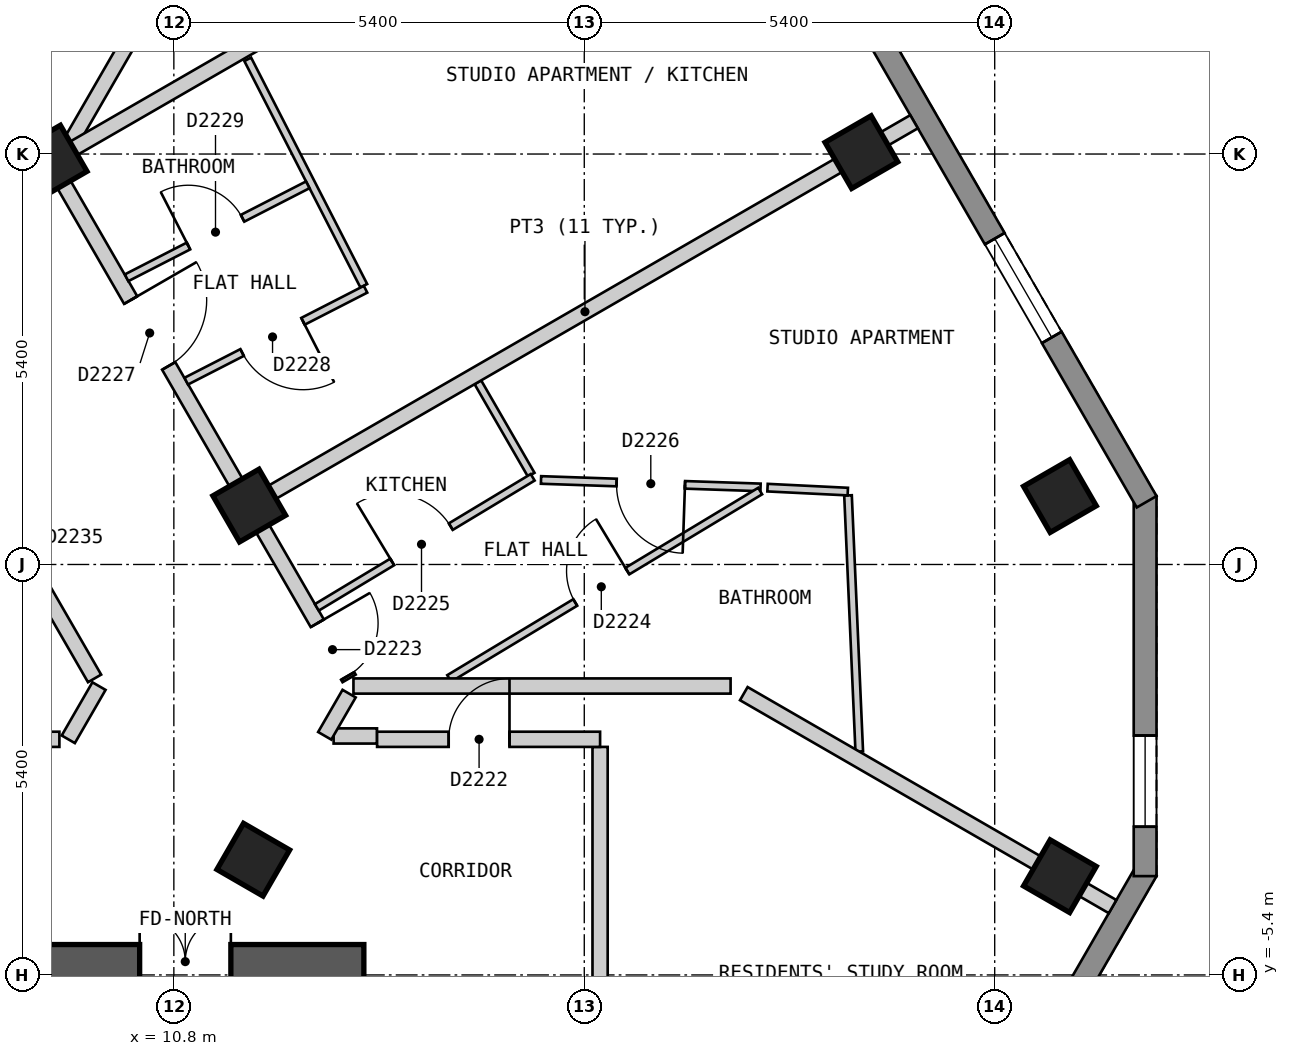
"""IFC4 building model, lengths in metres.
Left out: names, types, materials, properties, quantities, classifications, styles, units other than length and angle.
Written with IfcOpenShell. Run it as: python <this file> out.ifc"""

import sys

from ifc_helpers import new_model, si_unit, direction, frame, frame_2d, origin, origin_2d, place, context, subcontext, project, spatial, polyline, rectangle, outline, extrude, element, fill, save


model = new_model("IFC4")
c1 = context("Model", 3, precision=1e-05, world=origin(), true_north=direction((0.0, 1.0)))
c2 = subcontext(c1, "Body", "Model", "MODEL_VIEW")
j1 = project(units=[si_unit("LENGTHUNIT", "METRE"), si_unit("PLANEANGLEUNIT", "RADIAN")], contexts=[c1])
p1 = place(None, origin())
s1 = spatial("IfcSite", under=j1, at=p1, CompositionType="ELEMENT")
p2 = place(p1, origin())
s2 = spatial("IfcBuilding", under=s1, at=p2, CompositionType="ELEMENT")
p3 = place(p2, frame((0.0, 0.0, 223.8)))
s3 = spatial("IfcBuildingStorey", under=s2, at=p3, CompositionType="ELEMENT", Elevation=223.8)
for number, where, z_axis, x_axis in (
    (1, (22.458, -4.101, 0.0), (0.0, 0.0, 1.0), (0.5, 0.866, 0.0)),
    (2, (22.458, 0.9, 0.0), (0.0, 0.0, 1.0), (-0.5, 0.866, 0.0)),
    (3, (19.846, 5.425, 0.0), (0.0, 0.0, 1.0), (-0.5, 0.866, 0.0)),
    (4, (11.845, -3.884, 0.0), (0.0, 0.0, 1.0), (0.5, 0.866, 0.0)),
    (5, (11.792, 0.775, 0.0), (0.0, 0.0, 1.0), (-0.5, 0.866, 0.0)),
    (6, (9.179, 5.3, 0.0), (0.0, 0.0, 1.0), (-0.5, 0.866, 0.0)),
):
    element("IfcColumn", number, at=place(p3, frame(where, z_axis=z_axis, x_axis=x_axis)), inside=s3, PredefinedType="COLUMN", context=c2, shape_type="SweptSolid", body=[
        extrude(rectangle(XDim=0.7, YDim=0.7, at=origin_2d()), origin(), (0.0, 0.0, 1.0), 3.0),
    ])
p4 = place(p3, frame((-13.3, -5.225, 0.0), z_axis=(0.0, 0.0, 1.0), x_axis=(1.0, 0.0, 0.0)))
e7 = element("IfcWall", 7, at=p4, inside=s3, PredefinedType="SHEAR", context=c2, shape_type="SweptSolid", body=[
    extrude(rectangle(XDim=26.6, YDim=0.45, at=frame_2d((13.3, 0.0))), origin(), (0.0, 0.0, 1.0), 2.7),
])
p5 = place(p4, frame((23.65, 0.0, 0.0)))
e8 = element("IfcOpeningElement", 8, at=p5, cuts=e7, PredefinedType="OPENING", context=c2, shape_type="SweptSolid", body=[
    extrude(rectangle(XDim=1.2, YDim=2.1, at=frame_2d((0.6, 1.05))), frame((0.0, 0.235, 0.0), z_axis=(0.0, -1.0, 0.0), x_axis=(1.0, 0.0, 0.0)), (0.0, 0.0, 1.0), 0.47),
])
p6 = place(p3, frame((15.285, -18.425, 0.0), z_axis=(0.0, 0.0, 1.0), x_axis=(0.500012653391, 0.866018098222, 0.0)))
e9 = element("IfcWall", 9, at=p6, inside=s3, PredefinedType="SOLIDWALL", context=c2, shape_type="SweptSolid", body=[
    extrude(outline(polyline([(0.0, -0.15), (16.628, -0.15), (16.548, 0.15), (0.08, 0.15), (0.0, -0.15)])), origin(), (0.0, 0.0, 1.0), 2.7),
])
p7 = place(p6, frame((2.444, 0.0, 0.15)))
e10 = element("IfcOpeningElement", 10, at=p7, cuts=e9, PredefinedType="OPENING", context=c2, shape_type="SweptSolid", body=[
    extrude(rectangle(XDim=1.5, YDim=2.1, at=frame_2d((0.75, 1.05))), frame((0.0, 0.16, 0.0), z_axis=(0.0, -1.0, 0.0), x_axis=(1.0, 0.0, 0.0)), (0.0, 0.0, 1.0), 0.32),
])
p8 = place(p6, frame((7.564, 0.0, 0.15)))
e11 = element("IfcOpeningElement", 11, at=p8, cuts=e9, PredefinedType="OPENING", context=c2, shape_type="SweptSolid", body=[
    extrude(rectangle(XDim=1.5, YDim=2.1, at=frame_2d((0.75, 1.05))), frame((0.0, 0.16, 0.0), z_axis=(0.0, -1.0, 0.0), x_axis=(1.0, 0.0, 0.0)), (0.0, 0.0, 1.0), 0.32),
])
p9 = place(p6, frame((12.682, 0.0, 0.15)))
e12 = element("IfcOpeningElement", 12, at=p9, cuts=e9, PredefinedType="OPENING", context=c2, shape_type="SweptSolid", body=[
    extrude(rectangle(XDim=1.5, YDim=2.1, at=frame_2d((0.75, 1.05))), frame((0.0, 0.16, 0.0), z_axis=(0.0, -1.0, 0.0), x_axis=(1.0, 0.0, 0.0)), (0.0, 0.0, 1.0), 0.32),
])
p10 = place(p3, frame((23.579, -4.1, 0.0), z_axis=(0.0, 0.0, 1.0), x_axis=(0.0, 1.0, 0.0)))
e13 = element("IfcWall", 13, at=p10, inside=s3, PredefinedType="SOLIDWALL", context=c2, shape_type="SweptSolid", body=[
    extrude(outline(polyline([(0.0, -0.15), (5.0, -0.15), (4.92, 0.15), (0.08, 0.15), (0.0, -0.15)])), origin(), (0.0, 0.0, 1.0), 2.7),
])
p11 = place(p10, frame((0.65, 0.0, 0.15)))
e14 = element("IfcOpeningElement", 14, at=p11, cuts=e13, PredefinedType="OPENING", context=c2, shape_type="SweptSolid", body=[
    extrude(rectangle(XDim=1.2, YDim=2.1, at=frame_2d((0.6, 1.05))), frame((0.0, 0.16, 0.0), z_axis=(0.0, -1.0, 0.0), x_axis=(1.0, 0.0, 0.0)), (0.0, 0.0, 1.0), 0.32),
])
p12 = place(p3, frame((23.599, 0.825, 0.0), z_axis=(0.0, 0.0, 1.0), x_axis=(-0.500003656944, 0.866023292436, 0.0)))
e15 = element("IfcWall", 15, at=p12, inside=s3, PredefinedType="SOLIDWALL", context=c2, shape_type="SweptSolid", body=[
    extrude(outline(polyline([(0.0, -0.15), (22.17, -0.15), (22.09, 0.15), (0.08, 0.15), (0.0, -0.15)])), origin(), (0.0, 0.0, 1.0), 2.7),
])
p13 = place(p12, frame((2.497, 0.0, 0.15)))
e16 = element("IfcOpeningElement", 16, at=p13, cuts=e15, PredefinedType="OPENING", context=c2, shape_type="SweptSolid", body=[
    extrude(rectangle(XDim=1.5, YDim=2.1, at=frame_2d((0.75, 1.05))), frame((0.0, 0.16, 0.0), z_axis=(0.0, -1.0, 0.0), x_axis=(1.0, 0.0, 0.0)), (0.0, 0.0, 1.0), 0.32),
])
p14 = place(p12, frame((7.723, 0.0, 0.15)))
e17 = element("IfcOpeningElement", 17, at=p14, cuts=e15, PredefinedType="OPENING", context=c2, shape_type="SweptSolid", body=[
    extrude(rectangle(XDim=1.5, YDim=2.1, at=frame_2d((0.75, 1.05))), frame((0.0, 0.16, 0.0), z_axis=(0.0, -1.0, 0.0), x_axis=(1.0, 0.0, 0.0)), (0.0, 0.0, 1.0), 0.32),
])
p15 = place(p12, frame((12.948, 0.0, 0.15)))
e18 = element("IfcOpeningElement", 18, at=p15, cuts=e15, PredefinedType="OPENING", context=c2, shape_type="SweptSolid", body=[
    extrude(rectangle(XDim=1.5, YDim=2.1, at=frame_2d((0.75, 1.05))), frame((0.0, 0.16, 0.0), z_axis=(0.0, -1.0, 0.0), x_axis=(1.0, 0.0, 0.0)), (0.0, 0.0, 1.0), 0.32),
])
p16 = place(p12, frame((18.173, 0.0, 0.15)))
e19 = element("IfcOpeningElement", 19, at=p16, cuts=e15, PredefinedType="OPENING", context=c2, shape_type="SweptSolid", body=[
    extrude(rectangle(XDim=1.5, YDim=2.1, at=frame_2d((0.75, 1.05))), frame((0.0, 0.16, 0.0), z_axis=(0.0, -1.0, 0.0), x_axis=(1.0, 0.0, 0.0)), (0.0, 0.0, 1.0), 0.32),
])
p17 = place(p3, frame((7.622, 2.199, 0.0), z_axis=(0.0, 0.0, 1.0), x_axis=(0.499994660107, -0.866028486751, 0.0)))
e20 = element("IfcWall", 20, at=p17, inside=s3, PredefinedType="PARTITIONING", context=c2, shape_type="SweptSolid", body=[
    extrude(rectangle(XDim=4.27, YDim=0.2, at=frame_2d((2.135, 0.0))), origin(), (0.0, 0.0, 1.0), 2.7),
])
p18 = place(p17, frame((1.685, 0.0, 0.0)))
e21 = element("IfcOpeningElement", 21, at=p18, cuts=e20, PredefinedType="OPENING", context=c2, shape_type="SweptSolid", body=[
    extrude(rectangle(XDim=0.9, YDim=2.1, at=frame_2d((0.45, 1.05))), frame((0.0, 0.11, 0.0), z_axis=(0.0, -1.0, 0.0), x_axis=(1.0, 0.0, 0.0)), (0.0, 0.0, 1.0), 0.22),
])
p19 = place(p3, frame((9.238, 5.2, 0.0), z_axis=(0.0, 0.0, 1.0), x_axis=(0.500025705601, -0.86601056214, 0.0)))
e22 = element("IfcWall", 22, at=p19, inside=s3, PredefinedType="PARTITIONING", context=c2, shape_type="SweptSolid", body=[
    extrude(rectangle(XDim=7.735, YDim=0.2, at=frame_2d((3.868, 0.0))), origin(), (0.0, 0.0, 1.0), 2.7),
])
p20 = place(p19, frame((6.898, 0.0, 0.0)))
e23 = element("IfcOpeningElement", 23, at=p20, cuts=e22, PredefinedType="OPENING", context=c2, shape_type="SweptSolid", body=[
    extrude(rectangle(XDim=0.8, YDim=2.1, at=frame_2d((0.4, 1.05))), frame((0.0, 0.11, 0.0), z_axis=(0.0, -1.0, 0.0), x_axis=(1.0, 0.0, 0.0)), (0.0, 0.0, 1.0), 0.22),
])
p21 = place(p19, frame((1.988, 0.0, 0.0)))
e24 = element("IfcOpeningElement", 24, at=p21, cuts=e22, PredefinedType="OPENING", context=c2, shape_type="SweptSolid", body=[
    extrude(rectangle(XDim=1.0, YDim=2.1, at=frame_2d((0.5, 1.05))), frame((0.0, 0.11, 0.0), z_axis=(0.0, -1.0, 0.0), x_axis=(1.0, 0.0, 0.0)), (0.0, 0.0, 1.0), 0.22),
])
p22 = place(p3, frame((16.408, -2.4, 0.0), z_axis=(0.0, 0.0, 1.0), x_axis=(0.0, -1.0, 0.0)))
e25 = element("IfcWall", 25, at=p22, inside=s3, PredefinedType="PARTITIONING", context=c2, shape_type="SweptSolid", body=[
    extrude(rectangle(XDim=4.004, YDim=0.2, at=frame_2d((2.002, 0.0))), origin(), (0.0, 0.0, 1.0), 2.7),
])
p23 = place(p3, frame((12.902, -2.256, 0.0), z_axis=(0.0, 0.0, 1.0), x_axis=(1.0, 0.0, 0.0)))
e26 = element("IfcWall", 26, at=p23, inside=s3, PredefinedType="PARTITIONING", context=c2, shape_type="SweptSolid", body=[
    extrude(rectangle(XDim=0.571, YDim=0.2, at=frame_2d((0.285, 0.0))), origin(), (0.0, 0.0, 1.0), 2.7),
])
p24 = place(p3, frame((6.929, -2.3, 0.0), z_axis=(0.0, 0.0, 1.0), x_axis=(1.0, 0.0, 0.0)))
e27 = element("IfcWall", 27, at=p24, inside=s3, PredefinedType="PARTITIONING", context=c2, shape_type="SweptSolid", body=[
    extrude(rectangle(XDim=2.365, YDim=0.2, at=frame_2d((1.183, 0.0))), origin(), (0.0, 0.0, 1.0), 2.7),
])
p25 = place(p3, frame((13.474, -2.3, 0.0), z_axis=(0.0, 0.0, 1.0), x_axis=(1.0, 0.0, 0.0)))
e28 = element("IfcWall", 28, at=p25, inside=s3, PredefinedType="PARTITIONING", context=c2, shape_type="SweptSolid", body=[
    extrude(rectangle(XDim=2.934, YDim=0.2, at=frame_2d((1.467, 0.0))), origin(), (0.0, 0.0, 1.0), 2.7),
])
p26 = place(p25, frame((0.942, 0.0, 0.0)))
e29 = element("IfcOpeningElement", 29, at=p26, cuts=e28, PredefinedType="OPENING", context=c2, shape_type="SweptSolid", body=[
    extrude(rectangle(XDim=0.8, YDim=2.1, at=frame_2d((0.4, 1.05))), frame((0.0, 0.11, 0.0), z_axis=(0.0, -1.0, 0.0), x_axis=(1.0, 0.0, 0.0)), (0.0, 0.0, 1.0), 0.22),
])
p27 = place(p3, frame((9.354, 5.401, 0.0), z_axis=(0.0, 0.0, 1.0), x_axis=(0.499849222119, 0.866112437936, 0.0)))
e30 = element("IfcWall", 30, at=p27, inside=s3, PredefinedType="PARTITIONING", context=c2, shape_type="SweptSolid", body=[
    extrude(rectangle(XDim=3.001, YDim=0.2, at=frame_2d((1.5, 0.0))), origin(), (0.0, 0.0, 1.0), 2.7),
])
p28 = place(p3, frame((9.411, -2.3, 0.0), z_axis=(0.0, 0.0, 1.0), x_axis=(0.499940363534, 0.866059832176, 0.0)))
e31 = element("IfcWall", 31, at=p28, inside=s3, PredefinedType="PARTITIONING", context=c2, shape_type="SweptSolid", body=[
    extrude(rectangle(XDim=0.808, YDim=0.2, at=frame_2d((0.404, 0.0))), origin(), (0.0, 0.0, 1.0), 2.7),
])
p29 = place(p3, frame((12.785, -2.254, 0.0), z_axis=(0.0, 0.0, 1.0), x_axis=(0.500766044352, 0.865582675903, 0.0)))
e32 = element("IfcWall", 32, at=p29, inside=s3, PredefinedType="PARTITIONING", context=c2, shape_type="SweptSolid", body=[
    extrude(rectangle(XDim=0.641, YDim=0.2, at=frame_2d((0.321, 0.0))), origin(), (0.0, 0.0, 1.0), 2.7),
])
p30 = place(p3, frame((14.8, 2.397, 0.0), z_axis=(0.0, 0.0, 1.0), x_axis=(0.49989805765, -0.866084252228, 0.0)))
e33 = element("IfcWall", 33, at=p30, inside=s3, PredefinedType="PARTITIONING", context=c2, shape_type="SweptSolid", body=[
    extrude(rectangle(XDim=1.404, YDim=0.1, at=frame_2d((0.702, 0.0))), origin(), (0.0, 0.0, 1.0), 2.7),
])
p31 = place(p3, frame((11.772, 6.646, 0.0), z_axis=(0.0, 0.0, 1.0), x_axis=(0.456175983405, -0.889889584254, 0.0)))
e34 = element("IfcWall", 34, at=p31, inside=s3, PredefinedType="PARTITIONING", context=c2, shape_type="SweptSolid", body=[
    extrude(rectangle(XDim=3.348, YDim=0.1, at=frame_2d((1.674, 0.0))), origin(), (0.0, 0.0, 1.0), 2.7),
])
p32 = place(p3, frame((19.67, 0.909, 0.0), z_axis=(0.0, 0.0, 1.0), x_axis=(0.043933486644, -0.99903445824, 0.0)))
e35 = element("IfcWall", 35, at=p32, inside=s3, PredefinedType="PARTITIONING", context=c2, shape_type="SweptSolid", body=[
    extrude(rectangle(XDim=3.373, YDim=0.1, at=frame_2d((1.687, 0.0))), origin(), (0.0, 0.0, 1.0), 2.7),
])
p33 = place(p3, frame((15.631, 1.112, 0.0), z_axis=(0.0, 0.0, 1.0), x_axis=(0.999423034213, -0.033964668168, 0.0)))
e36 = element("IfcWall", 36, at=p33, inside=s3, PredefinedType="PARTITIONING", context=c2, shape_type="SweptSolid", body=[
    extrude(rectangle(XDim=2.89, YDim=0.1, at=frame_2d((1.445, 0.0))), origin(), (0.0, 0.0, 1.0), 2.7),
])
p34 = place(p33, frame((0.995, 0.0, 0.0)))
e37 = element("IfcOpeningElement", 37, at=p34, cuts=e36, PredefinedType="OPENING", context=c2, shape_type="SweptSolid", body=[
    extrude(rectangle(XDim=0.9, YDim=2.1, at=frame_2d((0.45, 1.05))), frame((0.0, 0.06, 0.0), z_axis=(0.0, -1.0, 0.0), x_axis=(1.0, 0.0, 0.0)), (0.0, 0.0, 1.0), 0.12),
])
p35 = place(p3, frame((10.178, 3.772, 0.0), z_axis=(0.0, 0.0, 1.0), x_axis=(0.889732071959, 0.456483121405, 0.0)))
e38 = element("IfcWall", 38, at=p35, inside=s3, PredefinedType="PARTITIONING", context=c2, shape_type="SweptSolid", body=[
    extrude(rectangle(XDim=2.679, YDim=0.1, at=frame_2d((1.34, 0.0))), origin(), (0.0, 0.0, 1.0), 2.7),
])
p36 = place(p35, frame((0.915, 0.0, 0.0)))
e39 = element("IfcOpeningElement", 39, at=p36, cuts=e38, PredefinedType="OPENING", context=c2, shape_type="SweptSolid", body=[
    extrude(rectangle(XDim=0.8, YDim=2.1, at=frame_2d((0.4, 1.05))), frame((0.0, 0.06, 0.0), z_axis=(0.0, -1.0, 0.0), x_axis=(1.0, 0.0, 0.0)), (0.0, 0.0, 1.0), 0.12),
])
p37 = place(p3, frame((10.963, 2.412, 0.0), z_axis=(0.0, 0.0, 1.0), x_axis=(0.889943997558, 0.456069820543, 0.0)))
e40 = element("IfcWall", 40, at=p37, inside=s3, PredefinedType="PARTITIONING", context=c2, shape_type="SweptSolid", body=[
    extrude(rectangle(XDim=2.651, YDim=0.1, at=frame_2d((1.325, 0.0))), origin(), (0.0, 0.0, 1.0), 2.7),
])
p38 = place(p37, frame((0.826, 0.0, 0.0)))
e41 = element("IfcOpeningElement", 41, at=p38, cuts=e40, PredefinedType="OPENING", context=c2, shape_type="SweptSolid", body=[
    extrude(rectangle(XDim=0.9, YDim=2.1, at=frame_2d((0.45, 1.05))), frame((0.0, 0.06, 0.0), z_axis=(0.0, -1.0, 0.0), x_axis=(1.0, 0.0, 0.0)), (0.0, 0.0, 1.0), 0.12),
])
p39 = place(p3, frame((12.681, -0.564, 0.0), z_axis=(0.0, 0.0, 1.0), x_axis=(0.856575482301, 0.516021746752, 0.0)))
e42 = element("IfcWall", 42, at=p39, inside=s3, PredefinedType="PARTITIONING", context=c2, shape_type="SweptSolid", body=[
    extrude(rectangle(XDim=3.316, YDim=0.1, at=frame_2d((1.658, 0.0))), origin(), (0.0, 0.0, 1.0), 2.7),
])
p40 = place(p39, frame((1.158, 0.0, 0.0)))
e43 = element("IfcOpeningElement", 43, at=p40, cuts=e42, PredefinedType="OPENING", context=c2, shape_type="SweptSolid", body=[
    extrude(rectangle(XDim=0.9, YDim=2.1, at=frame_2d((0.45, 1.05))), frame((0.0, 0.06, 0.0), z_axis=(0.0, -1.0, 0.0), x_axis=(1.0, 0.0, 0.0)), (0.0, 0.0, 1.0), 0.12),
])
p41 = place(p3, frame((14.423, -1.499, 0.0), z_axis=(0.0, 0.0, 1.0), x_axis=(0.856512638305, 0.516126050905, 0.0)))
e44 = element("IfcWall", 44, at=p41, inside=s3, PredefinedType="PARTITIONING", context=c2, shape_type="SweptSolid", body=[
    extrude(rectangle(XDim=4.776, YDim=0.1, at=frame_2d((2.388, 0.0))), origin(), (0.0, 0.0, 1.0), 2.7),
])
p42 = place(p41, frame((1.936, 0.0, 0.0)))
e45 = element("IfcOpeningElement", 45, at=p42, cuts=e44, PredefinedType="OPENING", context=c2, shape_type="SweptSolid", body=[
    extrude(rectangle(XDim=0.8, YDim=2.1, at=frame_2d((0.4, 1.05))), frame((0.0, 0.06, 0.0), z_axis=(0.0, -1.0, 0.0), x_axis=(1.0, 0.0, 0.0)), (0.0, 0.0, 1.0), 0.12),
])
p43 = place(p3, frame((18.299, -1.699, 0.0), z_axis=(0.0, 0.0, 1.0), x_axis=(0.865962789554, -0.50010843535, 0.0)))
e46 = element("IfcWall", 46, at=p43, inside=s3, PredefinedType="PARTITIONING", context=c2, shape_type="SweptSolid", body=[
    extrude(rectangle(XDim=5.603, YDim=0.2, at=frame_2d((2.801, 0.0))), origin(), (0.0, 0.0, 1.0), 2.7),
])
p44 = place(p3, frame((13.163, -1.599, 0.0), z_axis=(0.0, 0.0, 1.0), x_axis=(1.0, 0.0, 0.0)))
e47 = element("IfcWall", 47, at=p44, inside=s3, PredefinedType="PARTITIONING", context=c2, shape_type="SweptSolid", body=[
    extrude(rectangle(XDim=4.962, YDim=0.2, at=frame_2d((2.481, 0.0))), origin(), (0.0, 0.0, 1.0), 2.7),
])
p45 = place(p3, frame((11.879, 0.826, 0.0), z_axis=(0.0, 0.0, 1.0), x_axis=(0.866065245018, 0.499930986609, 0.0)))
e48 = element("IfcWall", 48, at=p45, inside=s3, PredefinedType="PARTITIONING", context=c2, shape_type="SweptSolid", body=[
    extrude(rectangle(XDim=10.0, YDim=0.2, at=frame_2d((5.0, 0.0))), origin(), (0.0, 0.0, 1.0), 2.7),
])
p46 = place(p3, frame((9.457, 5.461, 0.0), z_axis=(0.0, 0.0, 1.0), x_axis=(0.866043818878, 0.499968102766, 0.0)))
e49 = element("IfcWall", 49, at=p46, inside=s3, PredefinedType="PARTITIONING", context=c2, shape_type="SweptSolid", body=[
    extrude(rectangle(XDim=9.779, YDim=0.2, at=frame_2d((4.89, 0.0))), origin(), (0.0, 0.0, 1.0), 2.7),
])
p47 = place(p3, frame((18.611, 1.011, 0.0), z_axis=(0.0, 0.0, 1.0), x_axis=(0.998789491469, -0.049188939117, 0.0)))
e50 = element("IfcWall", 50, at=p47, inside=s3, PredefinedType="PARTITIONING", context=c2, shape_type="SweptSolid", body=[
    extrude(rectangle(XDim=1.057, YDim=0.1, at=frame_2d((0.529, 0.0))), origin(), (0.0, 0.0, 1.0), 2.7),
])
p48 = place(p11, origin())
e51 = element("IfcWindow", 51, at=p48, inside=s3, PartitioningType="SINGLE_PANEL", PredefinedType="WINDOW", context=c2, shape_type="SweptSolid", body=[
    extrude(rectangle(XDim=1.2, YDim=2.1, at=frame_2d((0.6, 1.05))), frame((0.0, 0.03, 0.0), z_axis=(0.0, -1.0, 0.0), x_axis=(1.0, 0.0, 0.0)), (0.0, 0.0, 1.0), 0.06),
])
fill(e14, e51)
p49 = place(p13, origin())
e52 = element("IfcWindow", 52, at=p49, inside=s3, PartitioningType="SINGLE_PANEL", PredefinedType="WINDOW", context=c2, shape_type="SweptSolid", body=[
    extrude(rectangle(XDim=1.5, YDim=2.1, at=frame_2d((0.75, 1.05))), frame((0.0, 0.03, 0.0), z_axis=(0.0, -1.0, 0.0), x_axis=(1.0, 0.0, 0.0)), (0.0, 0.0, 1.0), 0.06),
])
fill(e16, e52)
p50 = place(p26, origin())
e53 = element("IfcDoor", 53, at=p50, inside=s3, OperationType="SINGLE_SWING_RIGHT", PredefinedType="DOOR", context=c2, shape_type="SweptSolid", body=[
    extrude(rectangle(XDim=0.8, YDim=2.1, at=frame_2d((0.4, 1.05))), frame((0.0, 0.025, 0.0), z_axis=(0.0, -1.0, 0.0), x_axis=(1.0, 0.0, 0.0)), (0.0, 0.0, 1.0), 0.05),
])
fill(e29, e53)
p51 = place(p20, origin())
e54 = element("IfcDoor", 54, at=p51, inside=s3, OperationType="SINGLE_SWING_LEFT", PredefinedType="DOOR", context=c2, shape_type="SweptSolid", body=[
    extrude(rectangle(XDim=0.8, YDim=2.1, at=frame_2d((0.4, 1.05))), frame((0.0, 0.025, 0.0), z_axis=(0.0, -1.0, 0.0), x_axis=(1.0, 0.0, 0.0)), (0.0, 0.0, 1.0), 0.05),
])
fill(e23, e54)
p52 = place(p42, origin())
e55 = element("IfcDoor", 55, at=p52, inside=s3, OperationType="SINGLE_SWING_RIGHT", PredefinedType="DOOR", context=c2, shape_type="SweptSolid", body=[
    extrude(rectangle(XDim=0.8, YDim=2.1, at=frame_2d((0.4, 1.05))), frame((0.0, 0.025, 0.0), z_axis=(0.0, -1.0, 0.0), x_axis=(1.0, 0.0, 0.0)), (0.0, 0.0, 1.0), 0.05),
])
fill(e45, e55)
p53 = place(p40, origin())
e56 = element("IfcDoor", 56, at=p53, inside=s3, OperationType="SINGLE_SWING_LEFT", PredefinedType="DOOR", context=c2, shape_type="SweptSolid", body=[
    extrude(rectangle(XDim=0.9, YDim=2.1, at=frame_2d((0.45, 1.05))), frame((0.0, 0.025, 0.0), z_axis=(0.0, -1.0, 0.0), x_axis=(1.0, 0.0, 0.0)), (0.0, 0.0, 1.0), 0.05),
])
fill(e43, e56)
p54 = place(p34, origin())
e57 = element("IfcDoor", 57, at=p54, inside=s3, OperationType="SINGLE_SWING_RIGHT", PredefinedType="DOOR", context=c2, shape_type="SweptSolid", body=[
    extrude(rectangle(XDim=0.9, YDim=2.1, at=frame_2d((0.45, 1.05))), frame((0.0, 0.025, 0.0), z_axis=(0.0, -1.0, 0.0), x_axis=(1.0, 0.0, 0.0)), (0.0, 0.0, 1.0), 0.05),
])
fill(e37, e57)
p55 = place(p21, origin())
e58 = element("IfcDoor", 58, at=p55, inside=s3, OperationType="SINGLE_SWING_LEFT", PredefinedType="DOOR", context=c2, shape_type="SweptSolid", body=[
    extrude(rectangle(XDim=1.0, YDim=2.1, at=frame_2d((0.5, 1.05))), frame((0.0, 0.025, 0.0), z_axis=(0.0, -1.0, 0.0), x_axis=(1.0, 0.0, 0.0)), (0.0, 0.0, 1.0), 0.05),
])
fill(e24, e58)
p56 = place(p38, origin())
e59 = element("IfcDoor", 59, at=p56, inside=s3, OperationType="SINGLE_SWING_RIGHT", PredefinedType="DOOR", context=c2, shape_type="SweptSolid", body=[
    extrude(rectangle(XDim=0.9, YDim=2.1, at=frame_2d((0.45, 1.05))), frame((0.0, 0.025, 0.0), z_axis=(0.0, -1.0, 0.0), x_axis=(1.0, 0.0, 0.0)), (0.0, 0.0, 1.0), 0.05),
])
fill(e41, e59)
p57 = place(p36, origin())
e60 = element("IfcDoor", 60, at=p57, inside=s3, OperationType="SINGLE_SWING_LEFT", PredefinedType="DOOR", context=c2, shape_type="SweptSolid", body=[
    extrude(rectangle(XDim=0.8, YDim=2.1, at=frame_2d((0.4, 1.05))), frame((0.0, 0.025, 0.0), z_axis=(0.0, -1.0, 0.0), x_axis=(1.0, 0.0, 0.0)), (0.0, 0.0, 1.0), 0.05),
])
fill(e39, e60)
p58 = place(p5, origin())
e61 = element("IfcDoor", 61, at=p58, inside=s3, OperationType="DOUBLE_DOOR_SINGLE_SWING", PredefinedType="DOOR", context=c2, shape_type="SweptSolid", body=[
    extrude(rectangle(XDim=1.2, YDim=2.1, at=frame_2d((0.6, 1.05))), frame((0.0, 0.025, 0.0), z_axis=(0.0, -1.0, 0.0), x_axis=(1.0, 0.0, 0.0)), (0.0, 0.0, 1.0), 0.05),
])
fill(e8, e61)
save(model, sys.argv[1])
